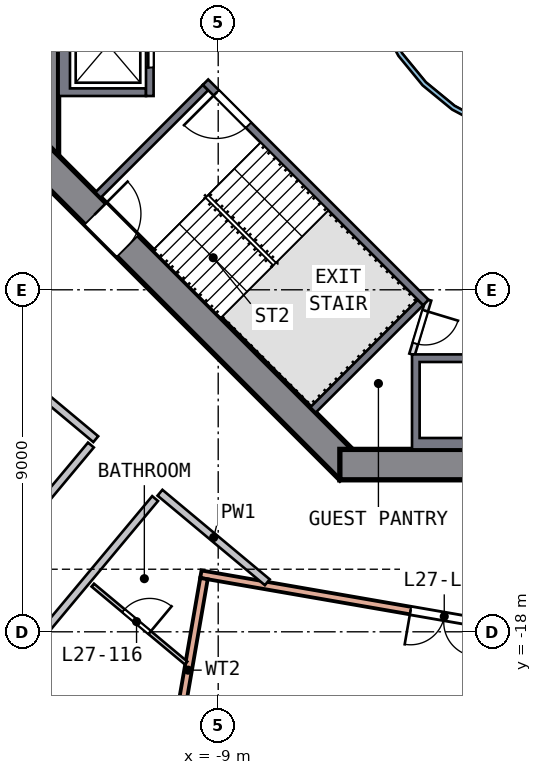
"""IFC4 building model, lengths in metres.
Left out: names, types, materials, properties, quantities, classifications, styles, units other than length and angle.
Written with IfcOpenShell. Run it as: python <this file> out.ifc"""

import sys

from ifc_helpers import new_model, si_unit, direction, frame, frame_2d, origin, place, context, subcontext, project, spatial, polyline, rectangle, outline, extrude, element, fill, save


model = new_model("IFC4")
c1 = context("Model", 3, precision=1e-05, world=origin(), true_north=direction((0.0, 1.0)))
c2 = subcontext(c1, "Body", "Model", "MODEL_VIEW")
j1 = project(units=[si_unit("LENGTHUNIT", "METRE"), si_unit("PLANEANGLEUNIT", "RADIAN")], contexts=[c1])
p1 = place(None, origin())
s1 = spatial("IfcSite", under=j1, at=p1, CompositionType="ELEMENT")
p2 = place(p1, origin())
s2 = spatial("IfcBuilding", under=s1, at=p2, CompositionType="ELEMENT")
p3 = place(p2, frame((0.0, 0.0, 115.0)))
s3 = spatial("IfcBuildingStorey", under=s2, at=p3, CompositionType="ELEMENT", Elevation=115.0)
p4 = place(p3, frame((-13.6, 5.799, 0.0), z_axis=(0.0, 0.0, 1.0), x_axis=(0.0, -1.0, 0.0)))
e1 = element("IfcWall", 1, at=p4, inside=s3, PredefinedType="SHEAR", context=c2, shape_type="SweptSolid", body=[
    extrude(rectangle(XDim=11.598, YDim=0.8, at=frame_2d((5.799, 0.0))), origin(), (0.0, 0.0, 1.0), 3.5),
])
p5 = place(p4, frame((4.899, 0.0, 0.0)))
e2 = element("IfcOpeningElement", 2, at=p5, cuts=e1, PredefinedType="OPENING", context=c2, shape_type="SweptSolid", body=[
    extrude(rectangle(XDim=1.8, YDim=2.1, at=frame_2d((0.9, 1.05))), frame((0.0, 0.41, 0.0), z_axis=(0.0, -1.0, 0.0), x_axis=(1.0, 0.0, 0.0)), (0.0, 0.0, 1.0), 0.82),
])
p6 = place(p3, frame((-13.717, -5.516, 0.0), z_axis=(0.0, 0.0, 1.0), x_axis=(0.707106781, -0.707106781, 0.0)))
e3 = element("IfcWall", 3, at=p6, inside=s3, PredefinedType="SHEAR", context=c2, shape_type="SweptSolid", body=[
    extrude(rectangle(XDim=11.598, YDim=0.8, at=frame_2d((5.799, 0.0))), origin(), (0.0, 0.0, 1.0), 3.5),
])
p7 = place(p6, frame((2.099, 0.0, 0.0)))
e4 = element("IfcOpeningElement", 4, at=p7, cuts=e3, PredefinedType="OPENING", context=c2, shape_type="SweptSolid", body=[
    extrude(rectangle(XDim=1.2, YDim=2.1, at=frame_2d((0.6, 1.05))), frame((0.0, 0.41, 0.0), z_axis=(0.0, -1.0, 0.0), x_axis=(1.0, 0.0, 0.0)), (0.0, 0.0, 1.0), 0.82),
])
p8 = place(p3, frame((-5.799, -13.6, 0.0), z_axis=(0.0, 0.0, 1.0), x_axis=(1.0, 0.0, 0.0)))
e5 = element("IfcWall", 5, at=p8, inside=s3, PredefinedType="SHEAR", context=c2, shape_type="SweptSolid", body=[
    extrude(rectangle(XDim=11.598, YDim=0.8, at=frame_2d((5.799, 0.0))), origin(), (0.0, 0.0, 1.0), 3.5),
])
p9 = place(p8, frame((4.899, 0.0, 0.0)))
e6 = element("IfcOpeningElement", 6, at=p9, cuts=e5, PredefinedType="OPENING", context=c2, shape_type="SweptSolid", body=[
    extrude(rectangle(XDim=1.8, YDim=2.1, at=frame_2d((0.9, 1.05))), frame((0.0, 0.41, 0.0), z_axis=(0.0, -1.0, 0.0), x_axis=(1.0, 0.0, 0.0)), (0.0, 0.0, 1.0), 0.82),
])
p10 = place(p3, frame((3.353, -18.707, 0.0), z_axis=(0.0, 0.0, 1.0), x_axis=(-0.985288842, 0.170897331, 0.0)))
e7 = element("IfcWall", 7, at=p10, inside=s3, PredefinedType="SOLIDWALL", context=c2, shape_type="SweptSolid", body=[
    extrude(rectangle(XDim=13.0, YDim=0.2, at=frame_2d((6.5, 0.0))), origin(), (0.0, 0.0, 1.0), 3.19),
])
p11 = place(p10, frame((5.6, 0.0, 0.0)))
e8 = element("IfcOpeningElement", 8, at=p11, cuts=e7, PredefinedType="OPENING", context=c2, shape_type="SweptSolid", body=[
    extrude(rectangle(XDim=1.8, YDim=2.4, at=frame_2d((0.9, 1.2))), frame((0.0, 0.11, 0.0), z_axis=(0.0, -1.0, 0.0), x_axis=(1.0, 0.0, 0.0)), (0.0, 0.0, 1.0), 0.22),
])
p12 = place(p3, frame((-10.21, -21.418, 0.0), z_axis=(0.0, 0.0, 1.0), x_axis=(0.170864929, 0.985294462, 0.0)))
e9 = element("IfcWall", 9, at=p12, inside=s3, PredefinedType="SOLIDWALL", context=c2, shape_type="SweptSolid", body=[
    extrude(rectangle(XDim=4.89, YDim=0.2, at=frame_2d((2.445, 0.0))), origin(), (0.0, 0.0, 1.0), 3.19),
])
p13 = place(p3, origin())
e10 = element("IfcWall", 10, at=p13, inside=s3, PredefinedType="SOLIDWALL", context=c2, shape_type="SweptSolid", body=[
    extrude(outline(polyline([(-13.2, -3.9), (-13.2, -1.2), (-10.9, -1.2), (-10.9, -1.4), (-12.9, -1.4), (-12.9, -3.7), (-10.9, -3.7), (-10.9, -3.9), (-13.2, -3.9)])), origin(), (0.0, 0.0, 1.0), 3.19),
])
p14 = place(p3, frame((-10.8, -1.2, 0.0), z_axis=(0.0, 0.0, 1.0), x_axis=(0.0, -1.0, 0.0)))
e11 = element("IfcWall", 11, at=p14, inside=s3, PredefinedType="SOLIDWALL", context=c2, shape_type="SweptSolid", body=[
    extrude(rectangle(XDim=2.7, YDim=0.2, at=frame_2d((1.35, 0.0))), origin(), (0.0, 0.0, 1.0), 3.19),
])
p15 = place(p14, frame((0.75, 0.0, 0.0)))
e12 = element("IfcOpeningElement", 12, at=p15, cuts=e11, PredefinedType="OPENING", context=c2, shape_type="SweptSolid", body=[
    extrude(rectangle(XDim=1.2, YDim=2.1, at=frame_2d((0.6, 1.05))), frame((0.0, 0.11, 0.0), z_axis=(0.0, -1.0, 0.0), x_axis=(1.0, 0.0, 0.0)), (0.0, 0.0, 1.0), 0.22),
])
p16 = place(p3, origin())
e13 = element("IfcWall", 13, at=p16, inside=s3, PredefinedType="SOLIDWALL", context=c2, shape_type="SweptSolid", body=[
    extrude(outline(polyline([(-1.2, -13.2), (-3.9, -13.2), (-3.9, -10.7), (-1.2, -10.7), (-1.2, -13.2)]), holes=[polyline([(-3.7, -10.9), (-3.7, -12.9), (-1.4, -12.9), (-1.4, -10.9), (-3.7, -10.9)])]), origin(), (0.0, 0.0, 1.0), 3.19),
])
p17 = place(p3, frame((-3.535, -9.334, 0.0), z_axis=(0.0, 0.0, 1.0), x_axis=(-0.707106781, 0.707106781, 0.0)))
e14 = element("IfcWall", 14, at=p17, inside=s3, PredefinedType="SOLIDWALL", context=c2, shape_type="SweptSolid", body=[
    extrude(rectangle(XDim=8.2, YDim=0.2, at=frame_2d((4.1, 0.0))), origin(), (0.0, 0.0, 1.0), 3.19),
])
p18 = place(p17, frame((6.6, 0.0, 0.0)))
e15 = element("IfcOpeningElement", 15, at=p18, cuts=e14, PredefinedType="OPENING", context=c2, shape_type="SweptSolid", body=[
    extrude(rectangle(XDim=1.2, YDim=2.1, at=frame_2d((0.6, 1.05))), frame((0.0, 0.11, 0.0), z_axis=(0.0, -1.0, 0.0), x_axis=(1.0, 0.0, 0.0)), (0.0, 0.0, 1.0), 0.22),
])
for number, where, z_axis, x_axis in (
    (16, (-9.334, -3.677, 0.0), (0.0, 0.0, 1.0), (-0.707, -0.707, 0.0)),
    (17, (-3.677, -9.334, 0.0), (0.0, 0.0, 1.0), (-0.707, -0.707, 0.0)),
):
    element("IfcWall", number, at=place(p3, frame(where, z_axis=z_axis, x_axis=x_axis)), inside=s3, PredefinedType="SOLIDWALL", context=c2, shape_type="SweptSolid", body=[
        extrude(rectangle(XDim=4.0, YDim=0.2, at=frame_2d((2.0, 0.0))), origin(), (0.0, 0.0, 1.0), 3.19),
    ])
p19 = place(p3, frame((-3.465, -9.263, 0.0), z_axis=(0.0, 0.0, 1.0), x_axis=(-0.289808785, -0.957084567, 0.0)))
e18 = element("IfcWall", 18, at=p19, inside=s3, PredefinedType="PARTITIONING", context=c2, shape_type="SweptSolid", body=[
    extrude(rectangle(XDim=1.501, YDim=0.15, at=frame_2d((0.75, 0.0))), origin(), (0.0, 0.0, 1.0), 3.19),
])
p20 = place(p19, frame((0.301, 0.0, 0.0)))
e19 = element("IfcOpeningElement", 19, at=p20, cuts=e18, PredefinedType="OPENING", context=c2, shape_type="SweptSolid", body=[
    extrude(rectangle(XDim=0.9, YDim=2.1, at=frame_2d((0.45, 1.05))), frame((0.0, 0.085, 0.0), z_axis=(0.0, -1.0, 0.0), x_axis=(1.0, 0.0, 0.0)), (0.0, 0.0, 1.0), 0.17),
])
p21 = place(p3, origin())
e20 = element("IfcWall", 20, at=p21, inside=s3, PredefinedType="SOLIDWALL", context=c2, shape_type="SweptSolid", body=[
    extrude(outline(polyline([(5.021, -0.999), (4.73, -1.959), (4.257, -2.844), (3.62, -3.62), (2.844, -4.257), (1.959, -4.73), (0.999, -5.021), (0.0, -5.12), (-0.999, -5.021), (-1.959, -4.73), (-2.844, -4.257), (-3.62, -3.62), (-4.257, -2.844), (-4.73, -1.959), (-5.021, -0.999), (-5.12, 0.0), (-5.021, 0.999), (-4.73, 1.959), (-4.257, 2.844), (-3.62, 3.62), (-2.844, 4.257), (-1.959, 4.73), (-0.999, 5.021), (0.0, 5.12), (0.999, 5.021), (1.959, 4.73), (2.844, 4.257), (3.62, 3.62), (4.257, 2.844), (4.73, 1.959), (5.021, 0.999), (5.12, 0.0), (5.021, -0.999)]), holes=[polyline([(4.904, 0.976), (4.619, 1.913), (4.157, 2.778), (3.535, 3.535), (2.778, 4.157), (1.913, 4.619), (0.976, 4.904), (0.0, 5.0), (-0.976, 4.904), (-1.913, 4.619), (-2.778, 4.157), (-3.535, 3.535), (-4.157, 2.778), (-4.619, 1.913), (-4.904, 0.976), (-5.0, 0.0), (-4.904, -0.976), (-4.619, -1.913), (-4.157, -2.778), (-3.535, -3.535), (-2.778, -4.157), (-1.913, -4.619), (-0.976, -4.904), (0.0, -5.0), (0.976, -4.904), (1.913, -4.619), (2.778, -4.157), (3.535, -3.535), (4.157, -2.778), (4.619, -1.913), (4.904, -0.976), (5.0, 0.0), (4.904, 0.976)])]), origin(), (0.0, 0.0, 1.0), 3.19),
])
p22 = place(p3, frame((-22.125, -24.801, 0.0), z_axis=(0.0, 0.0, 1.0), x_axis=(0.640651676, 0.767831642, 0.0)))
e21 = element("IfcWall", 21, at=p22, inside=s3, PredefinedType="SOLIDWALL", context=c2, shape_type="SweptSolid", body=[
    extrude(rectangle(XDim=15.259, YDim=0.2, at=frame_2d((7.63, 0.0))), origin(), (0.0, 0.0, 1.0), 3.19),
])
p23 = place(p22, frame((7.4, 0.0, 0.0)))
e22 = element("IfcOpeningElement", 22, at=p23, cuts=e21, PredefinedType="OPENING", context=c2, shape_type="SweptSolid", body=[
    extrude(rectangle(XDim=1.0, YDim=2.1, at=frame_2d((0.5, 1.05))), frame((0.0, 0.11, 0.0), z_axis=(0.0, -1.0, 0.0), x_axis=(1.0, 0.0, 0.0)), (0.0, 0.0, 1.0), 0.22),
])
p24 = place(p3, frame((-10.66, -14.494, 0.0), z_axis=(0.0, 0.0, 1.0), x_axis=(-0.640642243, -0.767839512, 0.0)))
e23 = element("IfcWall", 23, at=p24, inside=s3, PredefinedType="SOLIDWALL", context=c2, shape_type="SweptSolid", body=[
    extrude(rectangle(XDim=15.259, YDim=0.2, at=frame_2d((7.629, 0.0))), origin(), (0.0, 0.0, 1.0), 3.19),
])
p25 = place(p24, frame((6.85, 0.0, 0.0)))
e24 = element("IfcOpeningElement", 24, at=p25, cuts=e23, PredefinedType="OPENING", context=c2, shape_type="SweptSolid", body=[
    extrude(rectangle(XDim=1.0, YDim=2.1, at=frame_2d((0.5, 1.05))), frame((0.0, 0.11, 0.0), z_axis=(0.0, -1.0, 0.0), x_axis=(1.0, 0.0, 0.0)), (0.0, 0.0, 1.0), 0.22),
])
p26 = place(p3, frame((-14.832, -10.753, 0.0), z_axis=(0.0, 0.0, 1.0), x_axis=(0.767826787, -0.640657495, 0.0)))
e25 = element("IfcWall", 25, at=p26, inside=s3, PredefinedType="SOLIDWALL", context=c2, shape_type="SweptSolid", body=[
    extrude(rectangle(XDim=3.4, YDim=0.2, at=frame_2d((1.7, 0.0))), origin(), (0.0, 0.0, 1.0), 3.19),
])
p27 = place(p3, frame((-10.532, -14.34, 0.0), z_axis=(0.0, 0.0, 1.0), x_axis=(0.767796762, -0.640693477, 0.0)))
e26 = element("IfcWall", 26, at=p27, inside=s3, PredefinedType="SOLIDWALL", context=c2, shape_type="SweptSolid", body=[
    extrude(rectangle(XDim=3.678, YDim=0.2, at=frame_2d((1.839, 0.0))), origin(), (0.0, 0.0, 1.0), 3.19),
])
p28 = place(p3, frame((-12.301, -16.772, 0.0), z_axis=(0.0, 0.0, 1.0), x_axis=(0.767845845, -0.640634652, 0.0)))
e27 = element("IfcWall", 27, at=p28, inside=s3, PredefinedType="PARTITIONING", context=c2, shape_type="SweptSolid", body=[
    extrude(rectangle(XDim=3.199, YDim=0.1, at=frame_2d((1.6, 0.0))), origin(), (0.0, 0.0, 1.0), 3.19),
])
p29 = place(p28, frame((1.05, 0.0, 0.0)))
e28 = element("IfcOpeningElement", 28, at=p29, cuts=e27, PredefinedType="OPENING", context=c2, shape_type="SweptSolid", body=[
    extrude(rectangle(XDim=0.9, YDim=2.1, at=frame_2d((0.45, 1.05))), frame((0.0, 0.06, 0.0), z_axis=(0.0, -1.0, 0.0), x_axis=(1.0, 0.0, 0.0)), (0.0, 0.0, 1.0), 0.12),
])
p30 = place(p11, origin())
e29 = element("IfcDoor", 29, at=p30, inside=s3, OperationType="DOUBLE_DOOR_SINGLE_SWING", PredefinedType="DOOR", context=c2, shape_type="SweptSolid", body=[
    extrude(rectangle(XDim=1.8, YDim=2.4, at=frame_2d((0.9, 1.2))), frame((0.0, 0.025, 0.0), z_axis=(0.0, -1.0, 0.0), x_axis=(1.0, 0.0, 0.0)), (0.0, 0.0, 1.0), 0.05),
])
fill(e8, e29)
p31 = place(p15, origin())
e30 = element("IfcDoor", 30, at=p31, inside=s3, OperationType="DOUBLE_DOOR_SLIDING", PredefinedType="DOOR", context=c2, shape_type="SweptSolid", body=[
    extrude(rectangle(XDim=1.2, YDim=2.1, at=frame_2d((0.6, 1.05))), frame((0.0, 0.025, 0.0), z_axis=(0.0, -1.0, 0.0), x_axis=(1.0, 0.0, 0.0)), (0.0, 0.0, 1.0), 0.05),
])
fill(e12, e30)
p32 = place(p18, origin())
e31 = element("IfcDoor", 31, at=p32, inside=s3, OperationType="SINGLE_SWING_RIGHT", PredefinedType="DOOR", context=c2, shape_type="SweptSolid", body=[
    extrude(rectangle(XDim=1.2, YDim=2.1, at=frame_2d((0.6, 1.05))), frame((0.0, 0.025, 0.0), z_axis=(0.0, -1.0, 0.0), x_axis=(1.0, 0.0, 0.0)), (0.0, 0.0, 1.0), 0.05),
])
fill(e15, e31)
p33 = place(p7, origin())
e32 = element("IfcDoor", 32, at=p33, inside=s3, OperationType="SINGLE_SWING_LEFT", PredefinedType="DOOR", context=c2, shape_type="SweptSolid", body=[
    extrude(rectangle(XDim=1.2, YDim=2.1, at=frame_2d((0.6, 1.05))), frame((0.0, 0.025, 0.0), z_axis=(0.0, -1.0, 0.0), x_axis=(1.0, 0.0, 0.0)), (0.0, 0.0, 1.0), 0.05),
])
fill(e4, e32)
p34 = place(p20, origin())
e33 = element("IfcDoor", 33, at=p34, inside=s3, OperationType="SINGLE_SWING_LEFT", PredefinedType="DOOR", context=c2, shape_type="SweptSolid", body=[
    extrude(rectangle(XDim=0.9, YDim=2.1, at=frame_2d((0.45, 1.05))), frame((0.0, 0.025, 0.0), z_axis=(0.0, -1.0, 0.0), x_axis=(1.0, 0.0, 0.0)), (0.0, 0.0, 1.0), 0.05),
])
fill(e19, e33)
p35 = place(p29, origin())
e34 = element("IfcDoor", 34, at=p35, inside=s3, OperationType="SINGLE_SWING_RIGHT", PredefinedType="DOOR", context=c2, shape_type="SweptSolid", body=[
    extrude(rectangle(XDim=0.9, YDim=2.1, at=frame_2d((0.45, 1.05))), frame((0.0, 0.025, 0.0), z_axis=(0.0, -1.0, 0.0), x_axis=(1.0, 0.0, 0.0)), (0.0, 0.0, 1.0), 0.05),
])
fill(e28, e34)
save(model, sys.argv[1])
